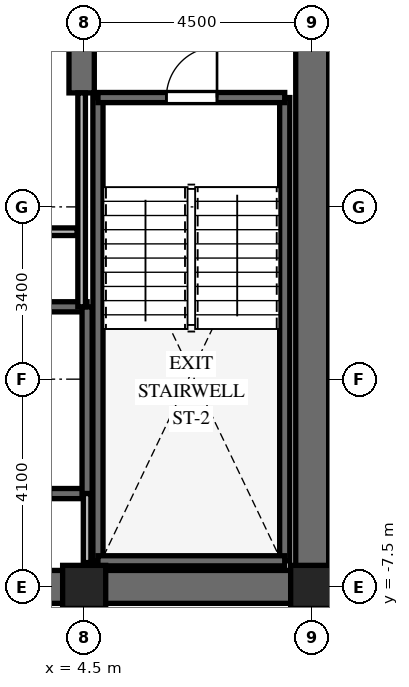
"""IFC4 building model, lengths in metres.
Left out: names, types, materials, properties, quantities, classifications, styles, units other than length and angle.
Written with IfcOpenShell. Run it as: python <this file> out.ifc"""

import sys

from ifc_helpers import new_model, si_unit, direction, frame, frame_2d, origin, origin_2d, place, context, subcontext, project, spatial, rectangle, extrude, element, fill, save


model = new_model("IFC4")
c1 = context("Model", 3, precision=1e-05, world=origin(), true_north=direction((0.0, 1.0)))
c2 = subcontext(c1, "Body", "Model", "MODEL_VIEW")
j1 = project(units=[si_unit("LENGTHUNIT", "METRE"), si_unit("PLANEANGLEUNIT", "RADIAN")], contexts=[c1])
p1 = place(None, origin())
s1 = spatial("IfcSite", under=j1, at=p1, CompositionType="ELEMENT")
p2 = place(p1, origin())
s2 = spatial("IfcBuilding", under=s1, at=p2, CompositionType="ELEMENT")
p3 = place(p2, frame((0.0, 0.0, 273.0)))
s3 = spatial("IfcBuildingStorey", under=s2, at=p3, CompositionType="ELEMENT", Elevation=273.0)
p4 = place(p3, frame((-9.325, -7.5, 0.0), z_axis=(0.0, 0.0, 1.0), x_axis=(1.0, 0.0, 0.0)))
e1 = element("IfcWall", 1, at=p4, inside=s3, PredefinedType="SHEAR", context=c2, shape_type="SweptSolid", body=[
    extrude(rectangle(XDim=18.65, YDim=0.65, at=frame_2d((9.325, 0.0))), origin(), (0.0, 0.0, 1.0), 3.9),
])
p5 = place(p4, frame((9.375, 0.0, 0.0)))
e2 = element("IfcOpeningElement", 2, at=p5, cuts=e1, PredefinedType="OPENING", context=c2, shape_type="SweptSolid", body=[
    extrude(rectangle(XDim=1.0, YDim=2.15, at=frame_2d((0.5, 1.075))), frame((0.0, 0.335, 0.0), z_axis=(0.0, -1.0, 0.0), x_axis=(1.0, 0.0, 0.0)), (0.0, 0.0, 1.0), 0.67),
])
p6 = place(p3, frame((9.0, -7.175, 0.0), z_axis=(0.0, 0.0, 1.0), x_axis=(0.0, 1.0, 0.0)))
e3 = element("IfcWall", 3, at=p6, inside=s3, PredefinedType="SHEAR", context=c2, shape_type="SweptSolid", body=[
    extrude(rectangle(XDim=14.35, YDim=0.65, at=frame_2d((7.175, 0.0))), origin(), (0.0, 0.0, 1.0), 3.9),
])
p7 = place(p6, frame((10.3, 0.0, 0.0)))
e4 = element("IfcOpeningElement", 4, at=p7, cuts=e3, PredefinedType="OPENING", context=c2, shape_type="SweptSolid", body=[
    extrude(rectangle(XDim=1.05, YDim=2.15, at=frame_2d((0.525, 1.075))), frame((0.0, 0.335, 0.0), z_axis=(0.0, -1.0, 0.0), x_axis=(1.0, 0.0, 0.0)), (0.0, 0.0, 1.0), 0.67),
])
p8 = place(p3, frame((4.45, 2.25, 0.0), z_axis=(0.0, 0.0, 1.0), x_axis=(0.0, 1.0, 0.0)))
e5 = element("IfcWall", 5, at=p8, inside=s3, PredefinedType="SHEAR", context=c2, shape_type="SweptSolid", body=[
    extrude(rectangle(XDim=4.925, YDim=0.5, at=frame_2d((2.462, 0.0))), origin(), (0.0, 0.0, 1.0), 3.9),
])
for number, where, z_axis, x_axis in (
    (6, (4.772, -6.985, 0.0), (0.0, 0.0, 1.0), (0.0, 1.0, 0.0)),
    (7, (8.458, -6.985, 0.0), (0.0, 0.0, 1.0), (0.0, 1.0, 0.0)),
):
    element("IfcWall", number, at=place(p3, frame(where, z_axis=z_axis, x_axis=x_axis)), inside=s3, PredefinedType="SHEAR", context=c2, shape_type="SweptSolid", body=[
        extrude(rectangle(XDim=9.143, YDim=0.2, at=frame_2d((4.572, 0.0))), origin(), (0.0, 0.0, 1.0), 3.9),
    ])
p9 = place(p3, frame((4.772, -6.985, 0.0), z_axis=(0.0, 0.0, 1.0), x_axis=(1.0, 0.0, 0.0)))
e8 = element("IfcWall", 8, at=p9, inside=s3, PredefinedType="SHEAR", context=c2, shape_type="SweptSolid", body=[
    extrude(rectangle(XDim=3.686, YDim=0.2, at=frame_2d((1.843, 0.0))), origin(), (0.0, 0.0, 1.0), 3.9),
])
p10 = place(p3, frame((4.772, 2.158, 0.0), z_axis=(0.0, 0.0, 1.0), x_axis=(1.0, 0.0, 0.0)))
e9 = element("IfcWall", 9, at=p10, inside=s3, PredefinedType="SHEAR", context=c2, shape_type="SweptSolid", body=[
    extrude(rectangle(XDim=3.686, YDim=0.2, at=frame_2d((1.843, 0.0))), origin(), (0.0, 0.0, 1.0), 3.9),
])
p11 = place(p10, frame((1.35, 0.0, 0.0)))
e10 = element("IfcOpeningElement", 10, at=p11, cuts=e9, PredefinedType="OPENING", context=c2, shape_type="SweptSolid", body=[
    extrude(rectangle(XDim=1.0, YDim=2.15, at=frame_2d((0.5, 1.075))), frame((0.0, 0.11, 0.0), z_axis=(0.0, -1.0, 0.0), x_axis=(1.0, 0.0, 0.0)), (0.0, 0.0, 1.0), 0.22),
])
p12 = place(p3, frame((-4.608, -5.658, 0.0), z_axis=(0.0, 0.0, 1.0), x_axis=(1.0, 0.0, 0.0)))
e11 = element("IfcWall", 11, at=p12, inside=s3, PredefinedType="SHEAR", context=c2, shape_type="SweptSolid", body=[
    extrude(rectangle(XDim=9.166, YDim=0.2, at=frame_2d((4.583, 0.0))), origin(), (0.0, 0.0, 1.0), 3.9),
])
p13 = place(p12, frame((7.45, 0.0, 0.0)))
e12 = element("IfcOpeningElement", 12, at=p13, cuts=e11, PredefinedType="OPENING", context=c2, shape_type="SweptSolid", body=[
    extrude(rectangle(XDim=1.0, YDim=2.15, at=frame_2d((0.5, 1.075))), frame((0.0, 0.11, 0.0), z_axis=(0.0, -1.0, 0.0), x_axis=(1.0, 0.0, 0.0)), (0.0, 0.0, 1.0), 0.22),
])
p14 = place(p3, frame((-4.608, -1.972, 0.0), z_axis=(0.0, 0.0, 1.0), x_axis=(1.0, 0.0, 0.0)))
e13 = element("IfcWall", 13, at=p14, inside=s3, PredefinedType="SHEAR", context=c2, shape_type="SweptSolid", body=[
    extrude(rectangle(XDim=9.166, YDim=0.2, at=frame_2d((4.583, 0.0))), origin(), (0.0, 0.0, 1.0), 3.9),
])
p15 = place(p3, frame((4.558, -5.658, 0.0), z_axis=(0.0, 0.0, 1.0), x_axis=(0.0, 1.0, 0.0)))
e14 = element("IfcWall", 14, at=p15, inside=s3, PredefinedType="SHEAR", context=c2, shape_type="SweptSolid", body=[
    extrude(rectangle(XDim=3.686, YDim=0.2, at=frame_2d((1.843, 0.0))), origin(), (0.0, 0.0, 1.0), 3.9),
])
for number, where, z_axis, x_axis in (
    (15, (4.5, -7.5, 0.0), (0.0, 0.0, 1.0), (1.0, 0.0, 0.0)),
    (16, (9.0, -7.5, 0.0), (0.0, 0.0, 1.0), (1.0, 0.0, 0.0)),
):
    element("IfcColumn", number, at=place(p3, frame(where, z_axis=z_axis, x_axis=x_axis)), inside=s3, PredefinedType="COLUMN", context=c2, shape_type="SweptSolid", body=[
        extrude(rectangle(XDim=0.85, YDim=0.85, at=origin_2d()), origin(), (0.0, 0.0, 1.0), 3.9),
    ])
p16 = place(p3, frame((4.558, -7.02, 0.0), z_axis=(0.0, 0.0, 1.0), x_axis=(0.0, 1.0, 0.0)))
e17 = element("IfcWall", 17, at=p16, inside=s3, PredefinedType="PARTITIONING", context=c2, shape_type="SweptSolid", body=[
    extrude(rectangle(XDim=1.362, YDim=0.15, at=frame_2d((0.681, 0.0))), origin(), (0.0, 0.0, 1.0), 3.6),
])
p17 = place(p3, frame((4.45, -1.972, 0.0), z_axis=(0.0, 0.0, 1.0), x_axis=(0.0, 1.0, 0.0)))
e18 = element("IfcWall", 18, at=p17, inside=s3, PredefinedType="PARTITIONING", context=c2, shape_type="SweptSolid", body=[
    extrude(rectangle(XDim=4.222, YDim=0.15, at=frame_2d((2.111, 0.0))), origin(), (0.0, 0.0, 1.0), 3.6),
])
p18 = place(p3, frame((-4.36, -0.49, 0.0), z_axis=(0.0, 0.0, 1.0), x_axis=(1.0, 0.0, 0.0)))
e19 = element("IfcWall", 19, at=p18, inside=s3, PredefinedType="PARTITIONING", context=c2, shape_type="SweptSolid", body=[
    extrude(rectangle(XDim=8.72, YDim=0.15, at=frame_2d((4.36, 0.0))), origin(), (0.0, 0.0, 1.0), 3.6),
])
p19 = place(p18, frame((3.86, 0.0, 0.0)))
e20 = element("IfcOpeningElement", 20, at=p19, cuts=e19, PredefinedType="OPENING", context=c2, shape_type="SweptSolid", body=[
    extrude(rectangle(XDim=0.9, YDim=2.03, at=frame_2d((0.45, 1.015))), frame((0.0, 0.085, 0.0), z_axis=(0.0, -1.0, 0.0), x_axis=(1.0, 0.0, 0.0)), (0.0, 0.0, 1.0), 0.17),
])
p20 = place(p11, origin())
e21 = element("IfcDoor", 21, at=p20, inside=s3, OperationType="SINGLE_SWING_RIGHT", PredefinedType="DOOR", context=c2, shape_type="SweptSolid", body=[
    extrude(rectangle(XDim=1.0, YDim=2.15, at=frame_2d((0.5, 1.075))), frame((0.0, 0.025, 0.0), z_axis=(0.0, -1.0, 0.0), x_axis=(1.0, 0.0, 0.0)), (0.0, 0.0, 1.0), 0.05),
])
fill(e10, e21)
save(model, sys.argv[1])
